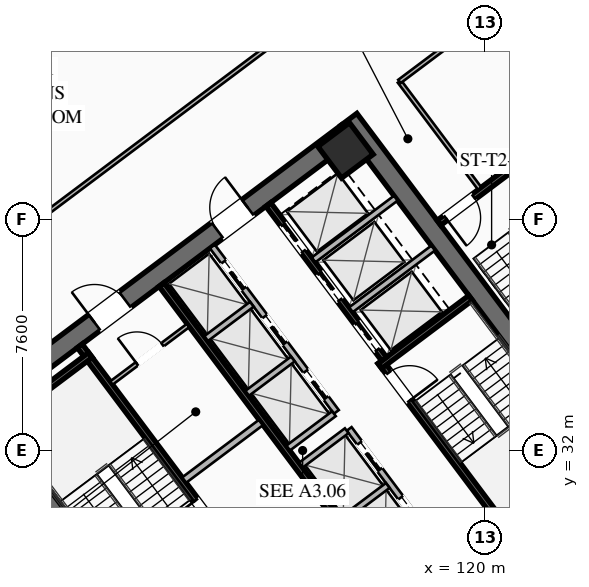
"""IFC4 building model, lengths in metres.
Left out: names, types, materials, properties, quantities, classifications, styles, units other than length and angle.
Written with IfcOpenShell. Run it as: python <this file> out.ifc"""

import sys

from ifc_helpers import new_model, si_unit, direction, frame, frame_2d, origin, origin_2d, place, context, subcontext, project, spatial, rectangle, hollow_rectangle, extrude, element, fill, save


model = new_model("IFC4")
c1 = context("Model", 3, precision=1e-05, world=origin(), true_north=direction((0.0, 1.0)))
c2 = subcontext(c1, "Body", "Model", "MODEL_VIEW")
j1 = project(units=[si_unit("LENGTHUNIT", "METRE"), si_unit("PLANEANGLEUNIT", "RADIAN")], contexts=[c1])
p1 = place(None, origin())
s1 = spatial("IfcSite", under=j1, at=p1, CompositionType="ELEMENT")
p2 = place(p1, origin())
s2 = spatial("IfcBuilding", under=s1, at=p2, CompositionType="ELEMENT")
p3 = place(p2, frame((0.0, 0.0, 106.25)))
s3 = spatial("IfcBuildingStorey", under=s2, at=p3, CompositionType="ELEMENT", Elevation=106.25)
for number, where, z_axis, x_axis in (
    (1, (112.476, 21.107, 0.0), (0.0, 0.0, 1.0), (-0.6, 0.8, 0.0)),
    (2, (115.524, 42.893, 0.0), (0.0, 0.0, 1.0), (0.6, -0.8, 0.0)),
):
    element("IfcWall", number, at=place(p3, frame(where, z_axis=z_axis, x_axis=x_axis)), inside=s3, PredefinedType="SHEAR", context=c2, shape_type="SweptSolid", body=[
        extrude(rectangle(XDim=15.6, YDim=0.65, at=frame_2d((7.8, 0.0))), origin(), (0.0, 0.0, 1.0), 3.55),
    ])
p4 = place(p3, frame((124.429, 30.478, 0.0), z_axis=(0.0, 0.0, 1.0), x_axis=(-0.799998028465, -0.600002628705, 0.0)))
e3 = element("IfcWall", 3, at=p4, inside=s3, PredefinedType="SHEAR", context=c2, shape_type="SweptSolid", body=[
    extrude(rectangle(XDim=14.86, YDim=0.65, at=frame_2d((7.43, 0.0))), origin(), (0.0, 0.0, 1.0), 3.55),
])
p5 = place(p4, frame((9.13, 0.0, 0.0)))
e4 = element("IfcOpeningElement", 4, at=p5, cuts=e3, PredefinedType="OPENING", context=c2, shape_type="SweptSolid", body=[
    extrude(rectangle(XDim=1.25, YDim=2.25, at=frame_2d((0.625, 1.125))), frame((0.0, 0.335, 0.0), z_axis=(0.0, -1.0, 0.0), x_axis=(1.0, 0.0, 0.0)), (0.0, 0.0, 1.0), 0.67),
])
p6 = place(p4, frame((4.08, 0.0, 0.0)))
e5 = element("IfcOpeningElement", 5, at=p6, cuts=e3, PredefinedType="OPENING", context=c2, shape_type="SweptSolid", body=[
    extrude(rectangle(XDim=1.25, YDim=2.25, at=frame_2d((0.625, 1.125))), frame((0.0, 0.335, 0.0), z_axis=(0.0, -1.0, 0.0), x_axis=(1.0, 0.0, 0.0)), (0.0, 0.0, 1.0), 0.67),
])
p7 = place(p3, frame((103.571, 33.522, 0.0), z_axis=(0.0, 0.0, 1.0), x_axis=(0.799998028465, 0.600002628705, 0.0)))
e6 = element("IfcWall", 6, at=p7, inside=s3, PredefinedType="SHEAR", context=c2, shape_type="SweptSolid", body=[
    extrude(rectangle(XDim=14.86, YDim=0.65, at=frame_2d((7.43, 0.0))), origin(), (0.0, 0.0, 1.0), 3.55),
])
p8 = place(p7, frame((4.48, 0.0, 0.0)))
e7 = element("IfcOpeningElement", 7, at=p8, cuts=e6, PredefinedType="OPENING", context=c2, shape_type="SweptSolid", body=[
    extrude(rectangle(XDim=1.25, YDim=2.25, at=frame_2d((0.625, 1.125))), frame((0.0, 0.335, 0.0), z_axis=(0.0, -1.0, 0.0), x_axis=(1.0, 0.0, 0.0)), (0.0, 0.0, 1.0), 0.67),
])
p9 = place(p7, frame((9.53, 0.0, 0.0)))
e8 = element("IfcOpeningElement", 8, at=p9, cuts=e6, PredefinedType="OPENING", context=c2, shape_type="SweptSolid", body=[
    extrude(rectangle(XDim=1.25, YDim=2.25, at=frame_2d((0.625, 1.125))), frame((0.0, 0.335, 0.0), z_axis=(0.0, -1.0, 0.0), x_axis=(1.0, 0.0, 0.0)), (0.0, 0.0, 1.0), 0.67),
])
p10 = place(p3, frame((115.41, 41.87, 0.0), z_axis=(0.0, 0.0, 1.0), x_axis=(0.799999996291, 0.600000004945, 0.0)))
e9 = element("IfcColumn", 9, at=p10, inside=s3, PredefinedType="COLUMN", context=c2, shape_type="SweptSolid", body=[
    extrude(hollow_rectangle(XDim=1.3, YDim=1.3, WallThickness=0.05, at=origin_2d()), origin(), (0.0, 0.0, 1.0), 3.25),
])
p11 = place(p3, frame((111.44, 29.08, 0.0), z_axis=(0.0, 0.0, 1.0), x_axis=(-0.600009827119, 0.799992629566, 0.0)))
e10 = element("IfcWall", 10, at=p11, inside=s3, PredefinedType="SHEAR", context=c2, shape_type="SweptSolid", body=[
    extrude(rectangle(XDim=7.95, YDim=0.2, at=frame_2d((3.975, 0.0))), origin(), (0.0, 0.0, 1.0), 3.25),
])
p12 = place(p11, frame((0.45, 0.0, 0.0)))
e11 = element("IfcOpeningElement", 11, at=p12, cuts=e10, PredefinedType="OPENING", context=c2, shape_type="SweptSolid", body=[
    extrude(rectangle(XDim=1.15, YDim=2.2, at=frame_2d((0.575, 1.1))), frame((0.0, 0.11, 0.0), z_axis=(0.0, -1.0, 0.0), x_axis=(1.0, 0.0, 0.0)), (0.0, 0.0, 1.0), 0.22),
])
p13 = place(p3, frame((104.036, 32.902, 0.0), z_axis=(0.0, 0.0, 1.0), x_axis=(0.800039270442, 0.59994763584, 0.0)))
e12 = element("IfcWall", 12, at=p13, inside=s3, PredefinedType="SHEAR", context=c2, shape_type="SweptSolid", body=[
    extrude(rectangle(XDim=3.73, YDim=0.2, at=frame_2d((1.865, 0.0))), origin(), (0.0, 0.0, 1.0), 3.25),
])
p14 = place(p3, frame((116.56, 34.92, 0.0), z_axis=(0.0, 0.0, 1.0), x_axis=(0.600009827119, -0.799992629566, 0.0)))
e13 = element("IfcWall", 13, at=p14, inside=s3, PredefinedType="SHEAR", context=c2, shape_type="SweptSolid", body=[
    extrude(rectangle(XDim=7.95, YDim=0.2, at=frame_2d((3.975, 0.0))), origin(), (0.0, 0.0, 1.0), 3.25),
])
p15 = place(p14, frame((0.45, 0.0, 0.0)))
e14 = element("IfcOpeningElement", 14, at=p15, cuts=e13, PredefinedType="OPENING", context=c2, shape_type="SweptSolid", body=[
    extrude(rectangle(XDim=1.15, YDim=2.2, at=frame_2d((0.575, 1.1))), frame((0.0, 0.11, 0.0), z_axis=(0.0, -1.0, 0.0), x_axis=(1.0, 0.0, 0.0)), (0.0, 0.0, 1.0), 0.22),
])
p16 = place(p3, frame((116.54, 34.78, 0.0), z_axis=(0.0, 0.0, 1.0), x_axis=(0.799984290658, 0.600020945218, 0.0)))
e15 = element("IfcWall", 15, at=p16, inside=s3, PredefinedType="SHEAR", context=c2, shape_type="SweptSolid", body=[
    extrude(rectangle(XDim=3.73, YDim=0.2, at=frame_2d((1.865, 0.0))), origin(), (0.0, 0.0, 1.0), 3.25),
])
p17 = place(p3, frame((117.938, 26.016, 0.0), z_axis=(0.0, 0.0, 1.0), x_axis=(-0.600005463273, 0.799995902516, 0.0)))
e16 = element("IfcWall", 16, at=p17, inside=s3, PredefinedType="SHEAR", context=c2, shape_type="SweptSolid", body=[
    extrude(rectangle(XDim=14.3, YDim=0.2, at=frame_2d((7.15, 0.0))), origin(), (0.0, 0.0, 1.0), 3.25),
])
p18 = place(p3, frame((110.104, 31.028, 0.0), z_axis=(0.0, 0.0, 1.0), x_axis=(0.800018601094, 0.59997519774, 0.0)))
e17 = element("IfcWall", 17, at=p18, inside=s3, PredefinedType="SOLIDWALL", context=c2, shape_type="SweptSolid", body=[
    extrude(rectangle(XDim=3.15, YDim=0.22, at=frame_2d((1.575, 0.0))), origin(), (0.0, 0.0, 1.0), 2.393),
])
p19 = place(p3, frame((112.87, 40.09, 0.0), z_axis=(0.0, 0.0, 1.0), x_axis=(0.599975393228, -0.800018454488, 0.0)))
e18 = element("IfcWall", 18, at=p19, inside=s3, PredefinedType="SHEAR", context=c2, shape_type="SweptSolid", body=[
    extrude(rectangle(XDim=6.35, YDim=0.2, at=frame_2d((3.175, 0.0))), origin(), (0.0, 0.0, 1.0), 3.25),
])
p20 = place(p19, frame((4.875, 0.0, 0.0)))
e19 = element("IfcOpeningElement", 19, at=p20, cuts=e18, PredefinedType="OPENING", context=c2, shape_type="SweptSolid", body=[
    extrude(rectangle(XDim=1.1, YDim=2.2, at=frame_2d((0.55, 1.1))), frame((0.0, 0.11, 0.0), z_axis=(0.0, -1.0, 0.0), x_axis=(1.0, 0.0, 0.0)), (0.0, 0.0, 1.0), 0.22),
])
p21 = place(p19, frame((2.825, 0.0, 0.0)))
e20 = element("IfcOpeningElement", 20, at=p21, cuts=e18, PredefinedType="OPENING", context=c2, shape_type="SweptSolid", body=[
    extrude(rectangle(XDim=1.1, YDim=2.2, at=frame_2d((0.55, 1.1))), frame((0.0, 0.11, 0.0), z_axis=(0.0, -1.0, 0.0), x_axis=(1.0, 0.0, 0.0)), (0.0, 0.0, 1.0), 0.22),
])
p22 = place(p19, frame((0.825, 0.0, 0.0)))
e21 = element("IfcOpeningElement", 21, at=p22, cuts=e18, PredefinedType="OPENING", context=c2, shape_type="SweptSolid", body=[
    extrude(rectangle(XDim=1.1, YDim=2.2, at=frame_2d((0.55, 1.1))), frame((0.0, 0.11, 0.0), z_axis=(0.0, -1.0, 0.0), x_axis=(1.0, 0.0, 0.0)), (0.0, 0.0, 1.0), 0.22),
])
for number, where, z_axis, x_axis in (
    (22, (115.59, 36.63, 0.0), (0.0, 0.0, 1.0), (0.8, 0.6, 0.0)),
    (23, (114.36, 38.27, 0.0), (0.0, 0.0, 1.0), (0.8, 0.6, 0.0)),
):
    element("IfcWall", number, at=place(p3, frame(where, z_axis=z_axis, x_axis=x_axis)), inside=s3, PredefinedType="SOLIDWALL", context=c2, shape_type="SweptSolid", body=[
        extrude(rectangle(XDim=3.38, YDim=0.2, at=frame_2d((1.69, 0.0))), origin(), (0.0, 0.0, 1.0), 3.25),
    ])
p23 = place(p3, frame((107.71, 34.22, 0.0), z_axis=(0.0, 0.0, 1.0), x_axis=(0.799981399002, 0.60002480053, 0.0)))
e24 = element("IfcWall", 24, at=p23, inside=s3, PredefinedType="PARTITIONING", context=c2, shape_type="SweptSolid", body=[
    extrude(rectangle(XDim=3.15, YDim=0.135, at=frame_2d((1.575, 0.0))), origin(), (0.0, 0.0, 1.0), 2.393),
])
p24 = place(p23, frame((1.05, 0.0, 0.0)))
e25 = element("IfcOpeningElement", 25, at=p24, cuts=e24, PredefinedType="OPENING", context=c2, shape_type="SweptSolid", body=[
    extrude(rectangle(XDim=1.05, YDim=2.2, at=frame_2d((0.525, 1.1))), frame((0.0, 0.077, 0.0), z_axis=(0.0, -1.0, 0.0), x_axis=(1.0, 0.0, 0.0)), (0.0, 0.0, 1.0), 0.155),
])
p25 = place(p3, frame((119.61, 27.27, 0.0), z_axis=(0.0, 0.0, 1.0), x_axis=(-0.600011488909, 0.79999138319, 0.0)))
e26 = element("IfcWall", 26, at=p25, inside=s3, PredefinedType="SOLIDWALL", context=c2, shape_type="SweptSolid", body=[
    extrude(rectangle(XDim=6.8, YDim=0.2, at=frame_2d((3.4, 0.0))), origin(), (0.0, 0.0, 1.0), 3.25),
])
p26 = place(p25, frame((0.625, 0.0, 0.0)))
e27 = element("IfcOpeningElement", 27, at=p26, cuts=e26, PredefinedType="OPENING", context=c2, shape_type="SweptSolid", body=[
    extrude(rectangle(XDim=1.1, YDim=2.2, at=frame_2d((0.55, 1.1))), frame((0.0, 0.11, 0.0), z_axis=(0.0, -1.0, 0.0), x_axis=(1.0, 0.0, 0.0)), (0.0, 0.0, 1.0), 0.22),
])
p27 = place(p25, frame((2.875, 0.0, 0.0)))
e28 = element("IfcOpeningElement", 28, at=p27, cuts=e26, PredefinedType="OPENING", context=c2, shape_type="SweptSolid", body=[
    extrude(rectangle(XDim=1.1, YDim=2.2, at=frame_2d((0.55, 1.1))), frame((0.0, 0.11, 0.0), z_axis=(0.0, -1.0, 0.0), x_axis=(1.0, 0.0, 0.0)), (0.0, 0.0, 1.0), 0.22),
])
p28 = place(p25, frame((5.125, 0.0, 0.0)))
e29 = element("IfcOpeningElement", 29, at=p28, cuts=e26, PredefinedType="OPENING", context=c2, shape_type="SweptSolid", body=[
    extrude(rectangle(XDim=1.1, YDim=2.2, at=frame_2d((0.55, 1.1))), frame((0.0, 0.11, 0.0), z_axis=(0.0, -1.0, 0.0), x_axis=(1.0, 0.0, 0.0)), (0.0, 0.0, 1.0), 0.22),
])
p29 = place(p3, frame((115.296, 29.722, 0.0), z_axis=(0.0, 0.0, 1.0), x_axis=(0.799984418148, 0.600020775241, 0.0)))
e30 = element("IfcWall", 30, at=p29, inside=s3, PredefinedType="SOLIDWALL", context=c2, shape_type="SweptSolid", body=[
    extrude(rectangle(XDim=1.88, YDim=0.2, at=frame_2d((0.94, 0.0))), origin(), (0.0, 0.0, 1.0), 3.25),
])
p30 = place(p3, frame((113.946, 31.522, 0.0), z_axis=(0.0, 0.0, 1.0), x_axis=(0.8, 0.6, 0.0)))
e31 = element("IfcWall", 31, at=p30, inside=s3, PredefinedType="SOLIDWALL", context=c2, shape_type="SweptSolid", body=[
    extrude(rectangle(XDim=1.88, YDim=0.2, at=frame_2d((0.94, 0.0))), origin(), (0.0, 0.0, 1.0), 3.25),
])
p31 = place(p3, frame((115.11, 33.27, 0.0), z_axis=(0.0, 0.0, 1.0), x_axis=(-0.600011488909, 0.79999138319, 0.0)))
e32 = element("IfcWall", 32, at=p31, inside=s3, PredefinedType="SOLIDWALL", context=c2, shape_type="SweptSolid", body=[
    extrude(rectangle(XDim=6.8, YDim=0.2, at=frame_2d((3.4, 0.0))), origin(), (0.0, 0.0, 1.0), 3.25),
])
p32 = place(p31, frame((0.575, 0.0, 0.0)))
e33 = element("IfcOpeningElement", 33, at=p32, cuts=e32, PredefinedType="OPENING", context=c2, shape_type="SweptSolid", body=[
    extrude(rectangle(XDim=1.1, YDim=2.2, at=frame_2d((0.55, 1.1))), frame((0.0, 0.11, 0.0), z_axis=(0.0, -1.0, 0.0), x_axis=(1.0, 0.0, 0.0)), (0.0, 0.0, 1.0), 0.22),
])
p33 = place(p31, frame((2.825, 0.0, 0.0)))
e34 = element("IfcOpeningElement", 34, at=p33, cuts=e32, PredefinedType="OPENING", context=c2, shape_type="SweptSolid", body=[
    extrude(rectangle(XDim=1.1, YDim=2.2, at=frame_2d((0.55, 1.1))), frame((0.0, 0.11, 0.0), z_axis=(0.0, -1.0, 0.0), x_axis=(1.0, 0.0, 0.0)), (0.0, 0.0, 1.0), 0.22),
])
p34 = place(p31, frame((5.075, 0.0, 0.0)))
e35 = element("IfcOpeningElement", 35, at=p34, cuts=e32, PredefinedType="OPENING", context=c2, shape_type="SweptSolid", body=[
    extrude(rectangle(XDim=1.1, YDim=2.2, at=frame_2d((0.55, 1.1))), frame((0.0, 0.11, 0.0), z_axis=(0.0, -1.0, 0.0), x_axis=(1.0, 0.0, 0.0)), (0.0, 0.0, 1.0), 0.22),
])
p35 = place(p3, frame((113.526, 32.082, 0.0), z_axis=(0.0, 0.0, 1.0), x_axis=(0.800046745961, 0.599937666993, 0.0)))
e36 = element("IfcWall", 36, at=p35, inside=s3, PredefinedType="SOLIDWALL", context=c2, shape_type="SweptSolid", body=[
    extrude(rectangle(XDim=1.88, YDim=0.2, at=frame_2d((0.94, 0.0))), origin(), (0.0, 0.0, 1.0), 3.25),
])
p36 = place(p3, frame((112.176, 33.882, 0.0), z_axis=(0.0, 0.0, 1.0), x_axis=(0.8, 0.6, 0.0)))
e37 = element("IfcWall", 37, at=p36, inside=s3, PredefinedType="SOLIDWALL", context=c2, shape_type="SweptSolid", body=[
    extrude(rectangle(XDim=1.88, YDim=0.2, at=frame_2d((0.94, 0.0))), origin(), (0.0, 0.0, 1.0), 3.25),
])
p37 = place(p3, frame((110.826, 35.682, 0.0), z_axis=(0.0, 0.0, 1.0), x_axis=(0.799984418148, 0.600020775241, 0.0)))
e38 = element("IfcWall", 38, at=p37, inside=s3, PredefinedType="SOLIDWALL", context=c2, shape_type="SweptSolid", body=[
    extrude(rectangle(XDim=1.88, YDim=0.2, at=frame_2d((0.94, 0.0))), origin(), (0.0, 0.0, 1.0), 3.25),
])
p38 = place(p3, frame((121.204, 41.528, 0.0), z_axis=(0.0, 0.0, 1.0), x_axis=(-0.800017232136, -0.599977023131, 0.0)))
e39 = element("IfcWall", 39, at=p38, inside=s3, PredefinedType="SHEAR", context=c2, shape_type="SweptSolid", body=[
    extrude(rectangle(XDim=3.4, YDim=0.2, at=frame_2d((1.7, 0.0))), origin(), (0.0, 0.0, 1.0), 3.25),
])
p39 = place(p38, frame((1.975, 0.0, 0.0)))
e40 = element("IfcOpeningElement", 40, at=p39, cuts=e39, PredefinedType="OPENING", context=c2, shape_type="SweptSolid", body=[
    extrude(rectangle(XDim=1.15, YDim=2.2, at=frame_2d((0.575, 1.1))), frame((0.0, 0.11, 0.0), z_axis=(0.0, -1.0, 0.0), x_axis=(1.0, 0.0, 0.0)), (0.0, 0.0, 1.0), 0.22),
])
p40 = place(p3, frame((119.824, 40.618, 0.0), z_axis=(0.0, 0.0, 1.0), x_axis=(-0.599982243973, 0.800013316712, 0.0)))
e41 = element("IfcWall", 41, at=p40, inside=s3, PredefinedType="PARTITIONING", context=c2, shape_type="SweptSolid", body=[
    extrude(rectangle(XDim=4.4, YDim=0.135, at=frame_2d((2.2, 0.0))), origin(), (0.0, 0.0, 1.0), 2.393),
])
p41 = place(p3, frame((98.276, 34.332, 0.0), z_axis=(0.0, 0.0, 1.0), x_axis=(0.800003113347, 0.599995848849, 0.0)))
e42 = element("IfcWall", 42, at=p41, inside=s3, PredefinedType="PARTITIONING", context=c2, shape_type="SweptSolid", body=[
    extrude(rectangle(XDim=28.23, YDim=0.135, at=frame_2d((14.115, 0.0))), origin(), (0.0, 0.0, 1.0), 2.393),
])
p42 = place(p41, frame((26.98, 0.0, 0.0)))
e43 = element("IfcOpeningElement", 43, at=p42, cuts=e42, PredefinedType="OPENING", context=c2, shape_type="SweptSolid", body=[
    extrude(rectangle(XDim=0.95, YDim=2.05, at=frame_2d((0.475, 1.025))), frame((0.0, 0.077, 0.0), z_axis=(0.0, -1.0, 0.0), x_axis=(1.0, 0.0, 0.0)), (0.0, 0.0, 1.0), 0.155),
])
p43 = place(p3, frame((134.18, 33.51, 0.0), z_axis=(0.0, 0.0, 1.0), x_axis=(-0.8, -0.6, 0.0)))
e44 = element("IfcWall", 44, at=p43, inside=s3, PredefinedType="PARTITIONING", context=c2, shape_type="SweptSolid", body=[
    extrude(rectangle(XDim=28.23, YDim=0.135, at=frame_2d((14.115, 0.0))), origin(), (0.0, 0.0, 1.0), 2.393),
])
p44 = place(p43, frame((25.637, 0.0, 0.0)))
e45 = element("IfcOpeningElement", 45, at=p44, cuts=e44, PredefinedType="OPENING", context=c2, shape_type="SweptSolid", body=[
    extrude(rectangle(XDim=0.95, YDim=2.05, at=frame_2d((0.475, 1.025))), frame((0.0, 0.077, 0.0), z_axis=(0.0, -1.0, 0.0), x_axis=(1.0, 0.0, 0.0)), (0.0, 0.0, 1.0), 0.155),
])
p45 = place(p43, frame((0.38, 0.0, 0.0)))
e46 = element("IfcOpeningElement", 46, at=p45, cuts=e44, PredefinedType="OPENING", context=c2, shape_type="SweptSolid", body=[
    extrude(rectangle(XDim=0.95, YDim=2.05, at=frame_2d((0.475, 1.025))), frame((0.0, 0.077, 0.0), z_axis=(0.0, -1.0, 0.0), x_axis=(1.0, 0.0, 0.0)), (0.0, 0.0, 1.0), 0.155),
])
p46 = place(p3, frame((125.224, 50.168, 0.0), z_axis=(0.0, 0.0, 1.0), x_axis=(-0.8, -0.6, 0.0)))
e47 = element("IfcWall", 47, at=p46, inside=s3, PredefinedType="PARTITIONING", context=c2, shape_type="SweptSolid", body=[
    extrude(rectangle(XDim=10.05, YDim=0.135, at=frame_2d((5.025, 0.0))), origin(), (0.0, 0.0, 1.0), 2.393),
])
p47 = place(p46, frame((4.9, 0.0, 0.0)))
e48 = element("IfcOpeningElement", 48, at=p47, cuts=e47, PredefinedType="OPENING", context=c2, shape_type="SweptSolid", body=[
    extrude(rectangle(XDim=0.95, YDim=2.05, at=frame_2d((0.475, 1.025))), frame((0.0, 0.077, 0.0), z_axis=(0.0, -1.0, 0.0), x_axis=(1.0, 0.0, 0.0)), (0.0, 0.0, 1.0), 0.155),
])
p48 = place(p3, frame((111.548, 16.636, 0.0), z_axis=(0.0, 0.0, 1.0), x_axis=(-0.600001772333, 0.799998670747, 0.0)))
e49 = element("IfcWall", 49, at=p48, inside=s3, PredefinedType="PARTITIONING", context=c2, shape_type="SweptSolid", body=[
    extrude(rectangle(XDim=22.04, YDim=0.135, at=frame_2d((11.02, 0.0))), origin(), (0.0, 0.0, 1.0), 2.393),
])
p49 = place(p48, frame((10.418, 0.0, 0.0)))
e50 = element("IfcOpeningElement", 50, at=p49, cuts=e49, PredefinedType="OPENING", context=c2, shape_type="SweptSolid", body=[
    extrude(rectangle(XDim=0.95, YDim=2.05, at=frame_2d((0.475, 1.025))), frame((0.0, 0.077, 0.0), z_axis=(0.0, -1.0, 0.0), x_axis=(1.0, 0.0, 0.0)), (0.0, 0.0, 1.0), 0.155),
])
p50 = place(p8, origin())
e51 = element("IfcDoor", 51, at=p50, inside=s3, OperationType="SINGLE_SWING_LEFT", PredefinedType="DOOR", context=c2, shape_type="SweptSolid", body=[
    extrude(rectangle(XDim=1.25, YDim=2.25, at=frame_2d((0.625, 1.125))), frame((0.0, 0.025, 0.0), z_axis=(0.0, -1.0, 0.0), x_axis=(1.0, 0.0, 0.0)), (0.0, 0.0, 1.0), 0.05),
])
fill(e7, e51)
p51 = place(p9, origin())
e52 = element("IfcDoor", 52, at=p51, inside=s3, OperationType="SINGLE_SWING_RIGHT", PredefinedType="DOOR", context=c2, shape_type="SweptSolid", body=[
    extrude(rectangle(XDim=1.25, YDim=2.25, at=frame_2d((0.625, 1.125))), frame((0.0, 0.025, 0.0), z_axis=(0.0, -1.0, 0.0), x_axis=(1.0, 0.0, 0.0)), (0.0, 0.0, 1.0), 0.05),
])
fill(e8, e52)
p52 = place(p12, origin())
e53 = element("IfcDoor", 53, at=p52, inside=s3, OperationType="SINGLE_SWING_RIGHT", PredefinedType="DOOR", context=c2, shape_type="SweptSolid", body=[
    extrude(rectangle(XDim=1.15, YDim=2.2, at=frame_2d((0.575, 1.1))), frame((0.0, 0.025, 0.0), z_axis=(0.0, -1.0, 0.0), x_axis=(1.0, 0.0, 0.0)), (0.0, 0.0, 1.0), 0.05),
])
fill(e11, e53)
p53 = place(p15, origin())
e54 = element("IfcDoor", 54, at=p53, inside=s3, OperationType="SINGLE_SWING_RIGHT", PredefinedType="DOOR", context=c2, shape_type="SweptSolid", body=[
    extrude(rectangle(XDim=1.15, YDim=2.2, at=frame_2d((0.575, 1.1))), frame((0.0, 0.025, 0.0), z_axis=(0.0, -1.0, 0.0), x_axis=(1.0, 0.0, 0.0)), (0.0, 0.0, 1.0), 0.05),
])
fill(e14, e54)
p54 = place(p24, origin())
e55 = element("IfcDoor", 55, at=p54, inside=s3, OperationType="SINGLE_SWING_LEFT", PredefinedType="DOOR", context=c2, shape_type="SweptSolid", body=[
    extrude(rectangle(XDim=1.05, YDim=2.2, at=frame_2d((0.525, 1.1))), frame((0.0, 0.025, 0.0), z_axis=(0.0, -1.0, 0.0), x_axis=(1.0, 0.0, 0.0)), (0.0, 0.0, 1.0), 0.05),
])
fill(e25, e55)
p55 = place(p39, origin())
e56 = element("IfcDoor", 56, at=p55, inside=s3, OperationType="SINGLE_SWING_RIGHT", PredefinedType="DOOR", context=c2, shape_type="SweptSolid", body=[
    extrude(rectangle(XDim=1.15, YDim=2.2, at=frame_2d((0.575, 1.1))), frame((0.0, 0.025, 0.0), z_axis=(0.0, -1.0, 0.0), x_axis=(1.0, 0.0, 0.0)), (0.0, 0.0, 1.0), 0.05),
])
fill(e40, e56)
p56 = place(p27, origin())
e57 = element("IfcDoor", 57, at=p56, inside=s3, OperationType="SLIDING_TO_LEFT", PredefinedType="DOOR", context=c2, shape_type="SweptSolid", body=[
    extrude(rectangle(XDim=1.1, YDim=2.2, at=frame_2d((0.55, 1.1))), frame((0.0, 0.025, 0.0), z_axis=(0.0, -1.0, 0.0), x_axis=(1.0, 0.0, 0.0)), (0.0, 0.0, 1.0), 0.05),
])
fill(e28, e57)
p57 = place(p28, origin())
e58 = element("IfcDoor", 58, at=p57, inside=s3, OperationType="SLIDING_TO_LEFT", PredefinedType="DOOR", context=c2, shape_type="SweptSolid", body=[
    extrude(rectangle(XDim=1.1, YDim=2.2, at=frame_2d((0.55, 1.1))), frame((0.0, 0.025, 0.0), z_axis=(0.0, -1.0, 0.0), x_axis=(1.0, 0.0, 0.0)), (0.0, 0.0, 1.0), 0.05),
])
fill(e29, e58)
p58 = place(p32, origin())
e59 = element("IfcDoor", 59, at=p58, inside=s3, OperationType="SLIDING_TO_LEFT", PredefinedType="DOOR", context=c2, shape_type="SweptSolid", body=[
    extrude(rectangle(XDim=1.1, YDim=2.2, at=frame_2d((0.55, 1.1))), frame((0.0, 0.025, 0.0), z_axis=(0.0, -1.0, 0.0), x_axis=(1.0, 0.0, 0.0)), (0.0, 0.0, 1.0), 0.05),
])
fill(e33, e59)
p59 = place(p33, origin())
e60 = element("IfcDoor", 60, at=p59, inside=s3, OperationType="SLIDING_TO_LEFT", PredefinedType="DOOR", context=c2, shape_type="SweptSolid", body=[
    extrude(rectangle(XDim=1.1, YDim=2.2, at=frame_2d((0.55, 1.1))), frame((0.0, 0.025, 0.0), z_axis=(0.0, -1.0, 0.0), x_axis=(1.0, 0.0, 0.0)), (0.0, 0.0, 1.0), 0.05),
])
fill(e34, e60)
p60 = place(p34, origin())
e61 = element("IfcDoor", 61, at=p60, inside=s3, OperationType="SLIDING_TO_LEFT", PredefinedType="DOOR", context=c2, shape_type="SweptSolid", body=[
    extrude(rectangle(XDim=1.1, YDim=2.2, at=frame_2d((0.55, 1.1))), frame((0.0, 0.025, 0.0), z_axis=(0.0, -1.0, 0.0), x_axis=(1.0, 0.0, 0.0)), (0.0, 0.0, 1.0), 0.05),
])
fill(e35, e61)
p61 = place(p20, origin())
e62 = element("IfcDoor", 62, at=p61, inside=s3, OperationType="SLIDING_TO_LEFT", PredefinedType="DOOR", context=c2, shape_type="SweptSolid", body=[
    extrude(rectangle(XDim=1.1, YDim=2.2, at=frame_2d((0.55, 1.1))), frame((0.0, 0.025, 0.0), z_axis=(0.0, -1.0, 0.0), x_axis=(1.0, 0.0, 0.0)), (0.0, 0.0, 1.0), 0.05),
])
fill(e19, e62)
p62 = place(p21, origin())
e63 = element("IfcDoor", 63, at=p62, inside=s3, OperationType="SLIDING_TO_LEFT", PredefinedType="DOOR", context=c2, shape_type="SweptSolid", body=[
    extrude(rectangle(XDim=1.1, YDim=2.2, at=frame_2d((0.55, 1.1))), frame((0.0, 0.025, 0.0), z_axis=(0.0, -1.0, 0.0), x_axis=(1.0, 0.0, 0.0)), (0.0, 0.0, 1.0), 0.05),
])
fill(e20, e63)
p63 = place(p22, origin())
e64 = element("IfcDoor", 64, at=p63, inside=s3, OperationType="SLIDING_TO_LEFT", PredefinedType="DOOR", context=c2, shape_type="SweptSolid", body=[
    extrude(rectangle(XDim=1.1, YDim=2.2, at=frame_2d((0.55, 1.1))), frame((0.0, 0.025, 0.0), z_axis=(0.0, -1.0, 0.0), x_axis=(1.0, 0.0, 0.0)), (0.0, 0.0, 1.0), 0.05),
])
fill(e21, e64)
save(model, sys.argv[1])
